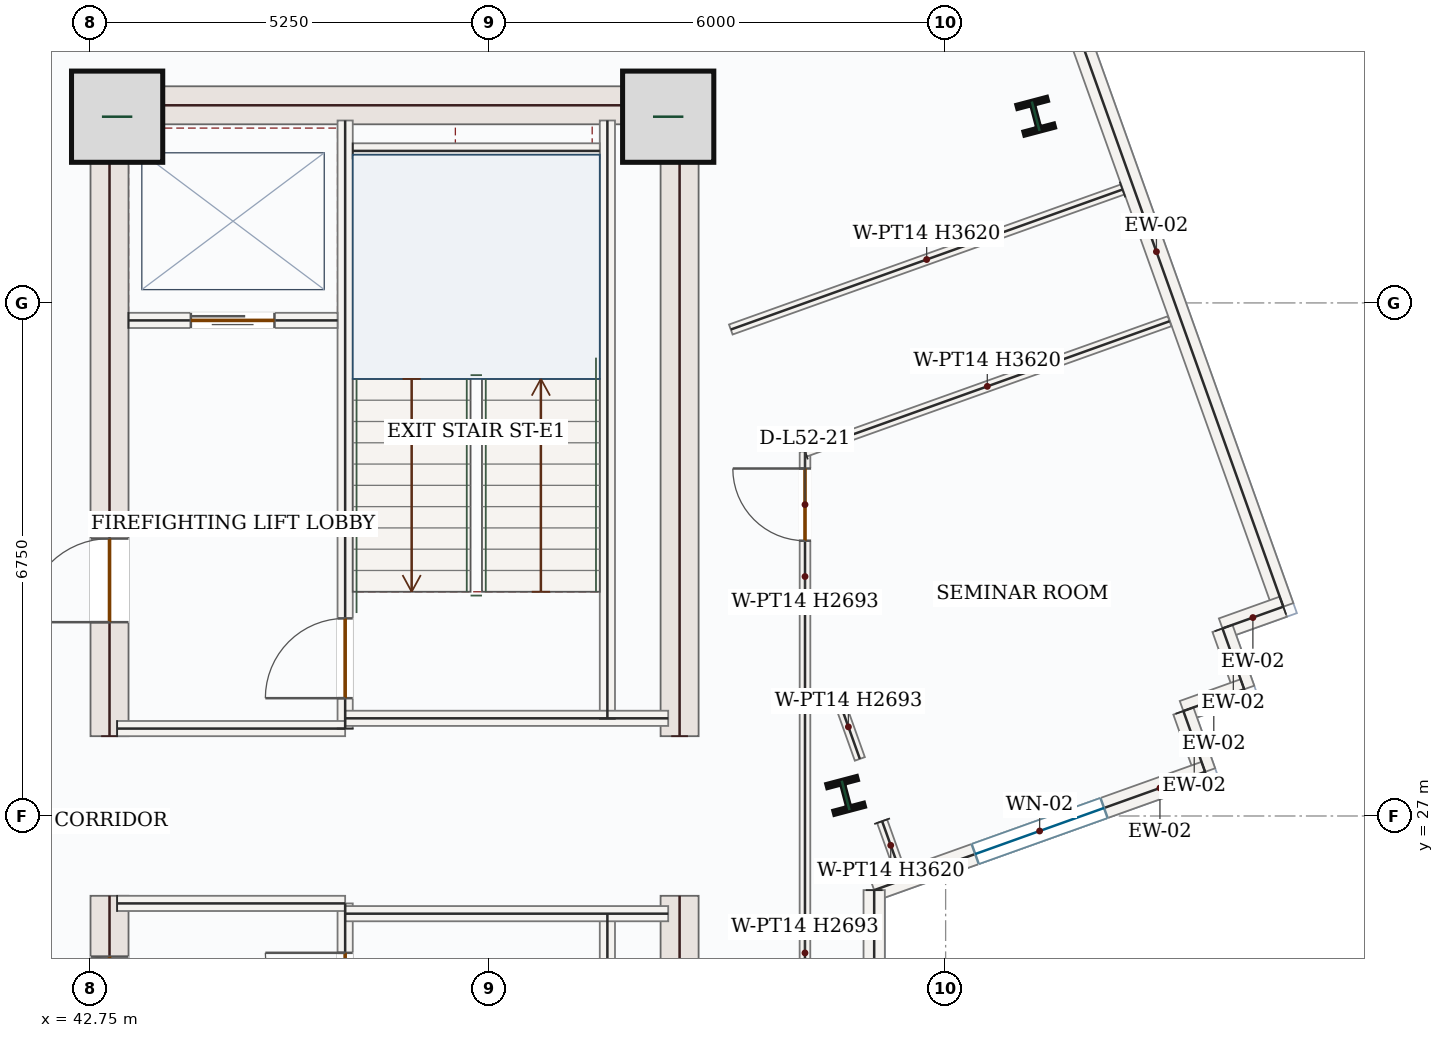
"""IFC4 building model, lengths in metres.
Left out: names, types, materials, properties, quantities, classifications, styles, units other than length and angle.
Written with IfcOpenShell. Run it as: python <this file> out.ifc"""

import sys

from ifc_helpers import new_model, si_unit, direction, frame, frame_2d, origin, origin_2d, place, context, subcontext, project, spatial, rectangle, i_section, extrude, source, transform, mapped, element, fill, save


model = new_model("IFC4")
c1 = context("Model", 3, precision=1e-05, world=origin(), true_north=direction((0.0, 1.0)))
c2 = subcontext(c1, "Body", "Model", "MODEL_VIEW")
j1 = project(units=[si_unit("LENGTHUNIT", "METRE"), si_unit("PLANEANGLEUNIT", "RADIAN")], contexts=[c1])
p1 = place(None, origin())
s1 = spatial("IfcSite", under=j1, at=p1, CompositionType="ELEMENT")
p2 = place(p1, origin())
s2 = spatial("IfcBuilding", under=s1, at=p2, CompositionType="ELEMENT")
p3 = place(p2, frame((0.0, 0.0, 221.4)))
s3 = spatial("IfcBuildingStorey", under=s2, at=p3, CompositionType="ELEMENT", Elevation=221.4)
p4 = place(p3, frame((43.0, 17.4, 0.0), z_axis=(0.0, 0.0, 1.0), x_axis=(0.0, 1.0, 0.0)))
e1 = element("IfcWall", 1, at=p4, inside=s3, PredefinedType="SHEAR", context=c2, shape_type="SweptSolid", body=[
    extrude(rectangle(XDim=8.55, YDim=0.5, at=frame_2d((4.275, 0.0))), origin(), (0.0, 0.0, 1.0), 3.62),
])
p5 = place(p4, frame((6.65, 0.0, 0.0)))
e2 = element("IfcOpeningElement", 2, at=p5, cuts=e1, PredefinedType="OPENING", context=c2, shape_type="SweptSolid", body=[
    extrude(rectangle(XDim=1.1, YDim=2.2, at=frame_2d((0.55, 1.1))), frame((0.0, 0.26, 0.0), z_axis=(0.0, -1.0, 0.0), x_axis=(1.0, 0.0, 0.0)), (0.0, 0.0, 1.0), 0.52),
])
p6 = place(p4, frame((1.75, 0.0, 0.0)))
e3 = element("IfcOpeningElement", 3, at=p6, cuts=e1, PredefinedType="OPENING", context=c2, shape_type="SweptSolid", body=[
    extrude(rectangle(XDim=1.3, YDim=2.2, at=frame_2d((0.65, 1.1))), frame((0.0, 0.26, 0.0), z_axis=(0.0, -1.0, 0.0), x_axis=(1.0, 0.0, 0.0)), (0.0, 0.0, 1.0), 0.52),
])
p7 = place(p4, frame((4.55, 0.0, 0.0)))
e4 = element("IfcOpeningElement", 4, at=p7, cuts=e1, PredefinedType="OPENING", context=c2, shape_type="SweptSolid", body=[
    extrude(rectangle(XDim=0.88, YDim=2.1, at=frame_2d((0.44, 1.05))), frame((0.0, 0.26, 0.0), z_axis=(0.0, -1.0, 0.0), x_axis=(1.0, 0.0, 0.0)), (0.0, 0.0, 1.0), 0.52),
])
p8 = place(p3, frame((43.0, 28.05, 0.0), z_axis=(0.0, 0.0, 1.0), x_axis=(0.0, 1.0, 0.0)))
e5 = element("IfcWall", 5, at=p8, inside=s3, PredefinedType="SHEAR", context=c2, shape_type="SweptSolid", body=[
    extrude(rectangle(XDim=8.55, YDim=0.5, at=frame_2d((4.275, 0.0))), origin(), (0.0, 0.0, 1.0), 3.62),
])
p9 = place(p8, frame((1.5, 0.0, 0.0)))
e6 = element("IfcOpeningElement", 6, at=p9, cuts=e5, PredefinedType="OPENING", context=c2, shape_type="SweptSolid", body=[
    extrude(rectangle(XDim=1.1, YDim=2.2, at=frame_2d((0.55, 1.1))), frame((0.0, 0.26, 0.0), z_axis=(0.0, -1.0, 0.0), x_axis=(1.0, 0.0, 0.0)), (0.0, 0.0, 1.0), 0.52),
])
m1 = source(origin(), c2, "Body", "SweptSolid", [
    extrude(rectangle(XDim=8.55, YDim=0.5, at=frame_2d((4.275, 0.0))), origin(), (0.0, 0.0, 1.0), 3.62),
])
for number, where, z_axis, x_axis in (
    (7, (50.5, 17.4, 0.0), (0.0, 0.0, 1.0), (0.0, 1.0, 0.0)),
    (8, (50.5, 28.05, 0.0), (0.0, 0.0, 1.0), (0.0, 1.0, 0.0)),
):
    element("IfcWall", number, at=place(p3, frame(where, z_axis=z_axis, x_axis=x_axis)), inside=s3, PredefinedType="SHEAR", context=c2, shape_type="MappedRepresentation", body=[
        mapped(m1, transform((0.0, 0.0, 0.0), x_axis=(1.0, 0.0, 0.0), y_axis=(0.0, 1.0, 0.0), z_axis=(0.0, 0.0, 1.0), scale=1.0)),
    ])
m2 = source(origin(), c2, "Body", "SweptSolid", [
    extrude(rectangle(XDim=7.0, YDim=0.5, at=frame_2d((3.5, 0.0))), origin(), (0.0, 0.0, 1.0), 3.62),
])
p10 = place(p3, frame((43.25, 36.35, 0.0), z_axis=(0.0, 0.0, 1.0), x_axis=(1.0, 0.0, 0.0)))
e9 = element("IfcWall", 9, at=p10, inside=s3, PredefinedType="SHEAR", context=c2, shape_type="MappedRepresentation", body=[
    mapped(m2, transform((0.0, 0.0, 0.0), x_axis=(1.0, 0.0, 0.0), y_axis=(0.0, 1.0, 0.0), z_axis=(0.0, 0.0, 1.0), scale=1.0)),
])
m3 = source(origin(), c2, "Body", "SweptSolid", [
    extrude(rectangle(XDim=1.2, YDim=1.2, at=origin_2d()), origin(), (0.0, 0.0, 1.0), 3.9),
])
for number, where, z_axis, x_axis in (
    (10, (43.1, 36.2, 0.0), (0.0, 0.0, 1.0), (1.0, 0.0, 0.0)),
    (11, (50.35, 36.2, 0.0), (0.0, 0.0, 1.0), (1.0, 0.0, 0.0)),
):
    element("IfcColumn", number, at=place(p3, frame(where, z_axis=z_axis, x_axis=x_axis)), inside=s3, PredefinedType="COLUMN", context=c2, shape_type="MappedRepresentation", body=[
        mapped(m3, transform((0.0, 0.0, 0.0), x_axis=(1.0, 0.0, 0.0), y_axis=(0.0, 1.0, 0.0), z_axis=(0.0, 0.0, 1.0), scale=1.0)),
    ])
m4 = source(origin(), c2, "Body", "SweptSolid", [
    extrude(i_section(OverallWidth=0.404, OverallDepth=0.407, WebThickness=0.027, FlangeThickness=0.044, FilletRadius=0.018, at=origin_2d()), origin(), (0.0, 0.0, 1.0), 3.9),
])
for number, where, z_axis, x_axis in (
    (12, (52.684, 27.271, 0.0), (0.0, 0.0, 1.0), (0.967, 0.255, 0.0)),
    (13, (55.185, 36.206, 0.0), (0.0, 0.0, 1.0), (0.967, 0.255, 0.0)),
):
    element("IfcColumn", number, at=place(p3, frame(where, z_axis=z_axis, x_axis=x_axis)), inside=s3, PredefinedType="COLUMN", context=c2, shape_type="MappedRepresentation", body=[
        mapped(m4, transform((0.0, 0.0, 0.0), x_axis=(1.0, 0.0, 0.0), y_axis=(0.0, 1.0, 0.0), z_axis=(0.0, 0.0, 1.0), scale=1.0)),
    ])
m5 = source(origin(), c2, "Body", "SweptSolid", [
    extrude(rectangle(XDim=9.92, YDim=0.28, at=frame_2d((4.96, 0.0))), origin(), (0.0, 0.0, 1.0), 3.62),
])
p11 = place(p3, frame((55.104, 39.095, 0.0), z_axis=(0.0, 0.0, 1.0), x_axis=(0.336532833412, -0.941671732631, 0.0)))
e14 = element("IfcWall", 14, at=p11, inside=s3, PredefinedType="SOLIDWALL", context=c2, shape_type="MappedRepresentation", body=[
    mapped(m5, transform((0.0, 0.0, 0.0), x_axis=(1.0, 0.0, 0.0), y_axis=(0.0, 1.0, 0.0), z_axis=(0.0, 0.0, 1.0), scale=1.0)),
])
m6 = source(origin(), c2, "Body", "SweptSolid", [
    extrude(rectangle(XDim=0.85, YDim=0.28, at=frame_2d((0.425, 0.0))), origin(), (0.0, 0.0, 1.0), 3.62),
])
p12 = place(p3, frame((58.442, 29.754, 0.0), z_axis=(0.0, 0.0, 1.0), x_axis=(-0.941624872587, -0.33666392638, 0.0)))
e15 = element("IfcWall", 15, at=p12, inside=s3, PredefinedType="SOLIDWALL", context=c2, shape_type="MappedRepresentation", body=[
    mapped(m6, transform((0.0, 0.0, 0.0), x_axis=(1.0, 0.0, 0.0), y_axis=(0.0, 1.0, 0.0), z_axis=(0.0, 0.0, 1.0), scale=1.0)),
])
m7 = source(origin(), c2, "Body", "SweptSolid", [
    extrude(rectangle(XDim=0.85, YDim=0.28, at=frame_2d((0.425, 0.0))), origin(), (0.0, 0.0, 1.0), 3.62),
])
p13 = place(p3, frame((57.642, 29.468, 0.0), z_axis=(0.0, 0.0, 1.0), x_axis=(0.336318202891, -0.941748409292, 0.0)))
e16 = element("IfcWall", 16, at=p13, inside=s3, PredefinedType="SOLIDWALL", context=c2, shape_type="MappedRepresentation", body=[
    mapped(m7, transform((0.0, 0.0, 0.0), x_axis=(1.0, 0.0, 0.0), y_axis=(0.0, 1.0, 0.0), z_axis=(0.0, 0.0, 1.0), scale=1.0)),
])
p14 = place(p3, frame((57.928, 28.667, 0.0), z_axis=(0.0, 0.0, 1.0), x_axis=(-0.941715910258, -0.336409191858, 0.0)))
e17 = element("IfcWall", 17, at=p14, inside=s3, PredefinedType="SOLIDWALL", context=c2, shape_type="MappedRepresentation", body=[
    mapped(m6, transform((0.0, 0.0, 0.0), x_axis=(1.0, 0.0, 0.0), y_axis=(0.0, 1.0, 0.0), z_axis=(0.0, 0.0, 1.0), scale=1.0)),
])
p15 = place(p3, frame((57.128, 28.381, 0.0), z_axis=(0.0, 0.0, 1.0), x_axis=(0.336572886112, -0.941657417713, 0.0)))
e18 = element("IfcWall", 18, at=p15, inside=s3, PredefinedType="SOLIDWALL", context=c2, shape_type="MappedRepresentation", body=[
    mapped(m7, transform((0.0, 0.0, 0.0), x_axis=(1.0, 0.0, 0.0), y_axis=(0.0, 1.0, 0.0), z_axis=(0.0, 0.0, 1.0), scale=1.0)),
])
p16 = place(p3, frame((57.414, 27.581, 0.0), z_axis=(0.0, 0.0, 1.0), x_axis=(-0.941673795185, -0.336527062004, 0.0)))
e19 = element("IfcWall", 19, at=p16, inside=s3, PredefinedType="SOLIDWALL", context=c2, shape_type="SweptSolid", body=[
    extrude(rectangle(XDim=4.624, YDim=0.28, at=frame_2d((2.312, 0.0))), origin(), (0.0, 0.0, 1.0), 3.62),
])
p17 = place(p16, frame((1.412, 0.0, 0.85)))
e20 = element("IfcOpeningElement", 20, at=p17, cuts=e19, PredefinedType="OPENING", context=c2, shape_type="SweptSolid", body=[
    extrude(rectangle(XDim=1.8, YDim=1.75, at=frame_2d((0.9, 0.875))), frame((0.0, 0.15, 0.0), z_axis=(0.0, -1.0, 0.0), x_axis=(1.0, 0.0, 0.0)), (0.0, 0.0, 1.0), 0.3),
])
p18 = place(p3, frame((53.06, 26.025, 0.0), z_axis=(0.0, 0.0, 1.0), x_axis=(0.0, -1.0, 0.0)))
e21 = element("IfcWall", 21, at=p18, inside=s3, PredefinedType="SOLIDWALL", context=c2, shape_type="SweptSolid", body=[
    extrude(rectangle(XDim=7.567, YDim=0.28, at=frame_2d((3.783, 0.0))), origin(), (0.0, 0.0, 1.0), 3.62),
])
p19 = place(p18, frame((2.883, 0.0, 0.85)))
e22 = element("IfcOpeningElement", 22, at=p19, cuts=e21, PredefinedType="OPENING", context=c2, shape_type="SweptSolid", body=[
    extrude(rectangle(XDim=1.8, YDim=1.75, at=frame_2d((0.9, 0.875))), frame((0.0, 0.15, 0.0), z_axis=(0.0, -1.0, 0.0), x_axis=(1.0, 0.0, 0.0)), (0.0, 0.0, 1.0), 0.3),
])
m8 = source(origin(), c2, "Body", "SweptSolid", [
    extrude(rectangle(XDim=7.87, YDim=0.2, at=frame_2d((3.935, 0.0))), origin(), (0.0, 0.0, 1.0), 3.62),
])
for number, where, z_axis, x_axis in (
    (23, (49.55, 17.85, 0.0), (0.0, 0.0, 1.0), (0.0, 1.0, 0.0)),
    (24, (49.55, 28.28, 0.0), (0.0, 0.0, 1.0), (0.0, 1.0, 0.0)),
):
    element("IfcWall", number, at=place(p3, frame(where, z_axis=z_axis, x_axis=x_axis)), inside=s3, PredefinedType="SOLIDWALL", context=c2, shape_type="MappedRepresentation", body=[
        mapped(m8, transform((0.0, 0.0, 0.0), x_axis=(1.0, 0.0, 0.0), y_axis=(0.0, 1.0, 0.0), z_axis=(0.0, 0.0, 1.0), scale=1.0)),
    ])
p20 = place(p3, frame((46.1, 17.85, 0.0), z_axis=(0.0, 0.0, 1.0), x_axis=(0.0, 1.0, 0.0)))
e25 = element("IfcWall", 25, at=p20, inside=s3, PredefinedType="SOLIDWALL", context=c2, shape_type="SweptSolid", body=[
    extrude(rectangle(XDim=8.0, YDim=0.2, at=frame_2d((4.0, 0.0))), origin(), (0.0, 0.0, 1.0), 3.62),
])
p21 = place(p20, frame((6.3, 0.0, 0.0)))
e26 = element("IfcOpeningElement", 26, at=p21, cuts=e25, PredefinedType="OPENING", context=c2, shape_type="SweptSolid", body=[
    extrude(rectangle(XDim=1.05, YDim=2.15, at=frame_2d((0.525, 1.075))), frame((0.0, 0.11, 0.0), z_axis=(0.0, -1.0, 0.0), x_axis=(1.0, 0.0, 0.0)), (0.0, 0.0, 1.0), 0.22),
])
p22 = place(p3, frame((46.1, 28.15, 0.0), z_axis=(0.0, 0.0, 1.0), x_axis=(0.0, 1.0, 0.0)))
e27 = element("IfcWall", 27, at=p22, inside=s3, PredefinedType="SOLIDWALL", context=c2, shape_type="SweptSolid", body=[
    extrude(rectangle(XDim=8.0, YDim=0.2, at=frame_2d((4.0, 0.0))), origin(), (0.0, 0.0, 1.0), 3.62),
])
p23 = place(p22, frame((0.4, 0.0, 0.0)))
e28 = element("IfcOpeningElement", 28, at=p23, cuts=e27, PredefinedType="OPENING", context=c2, shape_type="SweptSolid", body=[
    extrude(rectangle(XDim=1.05, YDim=2.15, at=frame_2d((0.525, 1.075))), frame((0.0, 0.11, 0.0), z_axis=(0.0, -1.0, 0.0), x_axis=(1.0, 0.0, 0.0)), (0.0, 0.0, 1.0), 0.22),
])
m9 = source(origin(), c2, "Body", "SweptSolid", [
    extrude(rectangle(XDim=3.0, YDim=0.2, at=frame_2d((1.5, 0.0))), origin(), (0.0, 0.0, 1.0), 3.62),
])
p24 = place(p3, frame((43.1, 25.85, 0.0), z_axis=(0.0, 0.0, 1.0), x_axis=(1.0, 0.0, 0.0)))
e29 = element("IfcWall", 29, at=p24, inside=s3, PredefinedType="SOLIDWALL", context=c2, shape_type="MappedRepresentation", body=[
    mapped(m9, transform((0.0, 0.0, 0.0), x_axis=(1.0, 0.0, 0.0), y_axis=(0.0, 1.0, 0.0), z_axis=(0.0, 0.0, 1.0), scale=1.0)),
])
m10 = source(origin(), c2, "Body", "SweptSolid", [
    extrude(rectangle(XDim=4.25, YDim=0.2, at=frame_2d((2.125, 0.0))), origin(), (0.0, 0.0, 1.0), 3.62),
])
p25 = place(p3, frame((46.1, 25.715, 0.0), z_axis=(0.0, 0.0, 1.0), x_axis=(1.0, 0.0, 0.0)))
e30 = element("IfcWall", 30, at=p25, inside=s3, PredefinedType="SOLIDWALL", context=c2, shape_type="MappedRepresentation", body=[
    mapped(m10, transform((0.0, 0.0, 0.0), x_axis=(1.0, 0.0, 0.0), y_axis=(0.0, 1.0, 0.0), z_axis=(0.0, 0.0, 1.0), scale=1.0)),
])
p26 = place(p3, frame((43.1, 28.15, 0.0), z_axis=(0.0, 0.0, 1.0), x_axis=(1.0, 0.0, 0.0)))
e31 = element("IfcWall", 31, at=p26, inside=s3, PredefinedType="SOLIDWALL", context=c2, shape_type="MappedRepresentation", body=[
    mapped(m9, transform((0.0, 0.0, 0.0), x_axis=(1.0, 0.0, 0.0), y_axis=(0.0, 1.0, 0.0), z_axis=(0.0, 0.0, 1.0), scale=1.0)),
])
p27 = place(p3, frame((46.1, 28.285, 0.0), z_axis=(0.0, 0.0, 1.0), x_axis=(1.0, 0.0, 0.0)))
e32 = element("IfcWall", 32, at=p27, inside=s3, PredefinedType="SOLIDWALL", context=c2, shape_type="MappedRepresentation", body=[
    mapped(m10, transform((0.0, 0.0, 0.0), x_axis=(1.0, 0.0, 0.0), y_axis=(0.0, 1.0, 0.0), z_axis=(0.0, 0.0, 1.0), scale=1.0)),
])
m11 = source(origin(), c2, "Body", "SweptSolid", [
    extrude(rectangle(XDim=3.25, YDim=0.2, at=frame_2d((1.625, 0.0))), origin(), (0.0, 0.0, 1.0), 3.62),
])
p28 = place(p3, frame((46.2, 35.75, 0.0), z_axis=(0.0, 0.0, 1.0), x_axis=(1.0, 0.0, 0.0)))
e33 = element("IfcWall", 33, at=p28, inside=s3, PredefinedType="SOLIDWALL", context=c2, shape_type="MappedRepresentation", body=[
    mapped(m11, transform((0.0, 0.0, 0.0), x_axis=(1.0, 0.0, 0.0), y_axis=(0.0, 1.0, 0.0), z_axis=(0.0, 0.0, 1.0), scale=1.0)),
])
p29 = place(p3, frame((43.25, 33.52, 0.0), z_axis=(0.0, 0.0, 1.0), x_axis=(1.0, 0.0, 0.0)))
e34 = element("IfcWall", 34, at=p29, inside=s3, PredefinedType="SOLIDWALL", context=c2, shape_type="SweptSolid", body=[
    extrude(rectangle(XDim=2.75, YDim=0.2, at=frame_2d((1.375, 0.0))), origin(), (0.0, 0.0, 1.0), 3.62),
])
p30 = place(p29, frame((0.82, 0.0, 0.0)))
e35 = element("IfcOpeningElement", 35, at=p30, cuts=e34, PredefinedType="OPENING", context=c2, shape_type="SweptSolid", body=[
    extrude(rectangle(XDim=1.1, YDim=2.15, at=frame_2d((0.55, 1.075))), frame((0.0, 0.11, 0.0), z_axis=(0.0, -1.0, 0.0), x_axis=(1.0, 0.0, 0.0)), (0.0, 0.0, 1.0), 0.22),
])
m12 = source(origin(), c2, "Body", "SweptSolid", [
    extrude(rectangle(XDim=9.038, YDim=0.14, at=frame_2d((4.519, 0.0))), origin(), (0.0, 0.0, 1.0), 2.693),
])
p31 = place(p3, frame((52.149, 20.68, 0.0), z_axis=(0.0, 0.0, 1.0), x_axis=(0.000135065776, 0.999999990879, 0.0)))
e36 = element("IfcWall", 36, at=p31, inside=s3, PredefinedType="PARTITIONING", context=c2, shape_type="MappedRepresentation", body=[
    mapped(m12, transform((0.0, 0.0, 0.0), x_axis=(1.0, 0.0, 0.0), y_axis=(0.0, 1.0, 0.0), z_axis=(0.0, 0.0, 1.0), scale=1.0)),
])
m13 = source(origin(), c2, "Body", "SweptSolid", [
    extrude(rectangle(XDim=0.896, YDim=0.14, at=frame_2d((0.448, 0.0))), origin(), (0.0, 0.0, 1.0), 2.693),
])
p32 = place(p3, frame((52.57, 28.595, 0.0), z_axis=(0.0, 0.0, 1.0), x_axis=(0.336509001165, -0.941680249413, 0.0)))
e37 = element("IfcWall", 37, at=p32, inside=s3, PredefinedType="PARTITIONING", context=c2, shape_type="MappedRepresentation", body=[
    mapped(m13, transform((0.0, 0.0, 0.0), x_axis=(1.0, 0.0, 0.0), y_axis=(0.0, 1.0, 0.0), z_axis=(0.0, 0.0, 1.0), scale=1.0)),
])
m14 = source(origin(), c2, "Body", "SweptSolid", [
    extrude(rectangle(XDim=0.674, YDim=0.14, at=frame_2d((0.337, 0.0))), origin(), (0.0, 0.0, 1.0), 3.62),
])
p33 = place(p3, frame((53.164, 26.931, 0.0), z_axis=(0.0, 0.0, 1.0), x_axis=(0.336588856473, -0.941651709337, 0.0)))
e38 = element("IfcWall", 38, at=p33, inside=s3, PredefinedType="PARTITIONING", context=c2, shape_type="MappedRepresentation", body=[
    mapped(m14, transform((0.0, 0.0, 0.0), x_axis=(1.0, 0.0, 0.0), y_axis=(0.0, 1.0, 0.0), z_axis=(0.0, 0.0, 1.0), scale=1.0)),
])
p34 = place(p3, frame((52.15, 29.829, 0.0), z_axis=(0.0, 0.0, 1.0), x_axis=(0.0, 1.0, 0.0)))
e39 = element("IfcWall", 39, at=p34, inside=s3, PredefinedType="PARTITIONING", context=c2, shape_type="SweptSolid", body=[
    extrude(rectangle(XDim=1.966, YDim=0.14, at=frame_2d((0.983, 0.0))), origin(), (0.0, 0.0, 1.0), 2.693),
])
p35 = place(p34, frame((0.792, 0.0, 0.0)))
e40 = element("IfcOpeningElement", 40, at=p35, cuts=e39, PredefinedType="OPENING", context=c2, shape_type="SweptSolid", body=[
    extrude(rectangle(XDim=0.95, YDim=2.15, at=frame_2d((0.475, 1.075))), frame((0.0, 0.08, 0.0), z_axis=(0.0, -1.0, 0.0), x_axis=(1.0, 0.0, 0.0)), (0.0, 0.0, 1.0), 0.16),
])
m15 = source(origin(), c2, "Body", "SweptSolid", [
    extrude(rectangle(XDim=5.093, YDim=0.14, at=frame_2d((2.547, 0.0))), origin(), (0.0, 0.0, 1.0), 3.62),
])
p36 = place(p3, frame((52.15, 31.795, 0.0), z_axis=(0.0, 0.0, 1.0), x_axis=(0.941667058904, 0.336545910947, 0.0)))
e41 = element("IfcWall", 41, at=p36, inside=s3, PredefinedType="PARTITIONING", context=c2, shape_type="MappedRepresentation", body=[
    mapped(m15, transform((0.0, 0.0, 0.0), x_axis=(1.0, 0.0, 0.0), y_axis=(0.0, 1.0, 0.0), z_axis=(0.0, 0.0, 1.0), scale=1.0)),
])
m16 = source(origin(), c2, "Body", "SweptSolid", [
    extrude(rectangle(XDim=5.473, YDim=0.14, at=frame_2d((2.736, 0.0))), origin(), (0.0, 0.0, 1.0), 3.62),
])
p37 = place(p3, frame((56.327, 35.242, 0.0), z_axis=(0.0, 0.0, 1.0), x_axis=(-0.941665179086, -0.336551170695, 0.0)))
e42 = element("IfcWall", 42, at=p37, inside=s3, PredefinedType="PARTITIONING", context=c2, shape_type="MappedRepresentation", body=[
    mapped(m16, transform((0.0, 0.0, 0.0), x_axis=(1.0, 0.0, 0.0), y_axis=(0.0, 1.0, 0.0), z_axis=(0.0, 0.0, 1.0), scale=1.0)),
])
m17 = source(origin(), c2, "Body", "SweptSolid", [
    extrude(rectangle(XDim=1.8, YDim=1.75, at=frame_2d((0.9, 0.875))), frame((0.0, 0.03, 0.0), z_axis=(0.0, -1.0, 0.0), x_axis=(1.0, 0.0, 0.0)), (0.0, 0.0, 1.0), 0.06),
])
p38 = place(p17, origin())
e43 = element("IfcWindow", 43, at=p38, inside=s3, PartitioningType="DOUBLE_PANEL_VERTICAL", PredefinedType="WINDOW", context=c2, shape_type="MappedRepresentation", body=[
    mapped(m17, transform((0.0, 0.0, 0.0), x_axis=(1.0, 0.0, 0.0), y_axis=(0.0, 1.0, 0.0), z_axis=(0.0, 0.0, 1.0), scale=1.0)),
])
fill(e20, e43)
m18 = source(origin(), c2, "Body", "SweptSolid", [
    extrude(rectangle(XDim=1.05, YDim=2.15, at=frame_2d((0.525, 1.075))), frame((0.0, 0.025, 0.0), z_axis=(0.0, -1.0, 0.0), x_axis=(1.0, 0.0, 0.0)), (0.0, 0.0, 1.0), 0.05),
])
p39 = place(p23, origin())
e44 = element("IfcDoor", 44, at=p39, inside=s3, OperationType="SINGLE_SWING_LEFT", PredefinedType="DOOR", context=c2, shape_type="MappedRepresentation", body=[
    mapped(m18, transform((0.0, 0.0, 0.0), x_axis=(1.0, 0.0, 0.0), y_axis=(0.0, 1.0, 0.0), z_axis=(0.0, 0.0, 1.0), scale=1.0)),
])
fill(e28, e44)
p40 = place(p21, origin())
e45 = element("IfcDoor", 45, at=p40, inside=s3, OperationType="SINGLE_SWING_RIGHT", PredefinedType="DOOR", context=c2, shape_type="MappedRepresentation", body=[
    mapped(m18, transform((0.0, 0.0, 0.0), x_axis=(1.0, 0.0, 0.0), y_axis=(0.0, 1.0, 0.0), z_axis=(0.0, 0.0, 1.0), scale=1.0)),
])
fill(e26, e45)
m19 = source(origin(), c2, "Body", "SweptSolid", [
    extrude(rectangle(XDim=1.1, YDim=2.15, at=frame_2d((0.55, 1.075))), frame((0.0, 0.025, 0.0), z_axis=(0.0, -1.0, 0.0), x_axis=(1.0, 0.0, 0.0)), (0.0, 0.0, 1.0), 0.05),
])
p41 = place(p30, origin())
e46 = element("IfcDoor", 46, at=p41, inside=s3, OperationType="DOUBLE_DOOR_SLIDING", PredefinedType="DOOR", context=c2, shape_type="MappedRepresentation", body=[
    mapped(m19, transform((0.0, 0.0, 0.0), x_axis=(1.0, 0.0, 0.0), y_axis=(0.0, 1.0, 0.0), z_axis=(0.0, 0.0, 1.0), scale=1.0)),
])
fill(e35, e46)
m20 = source(origin(), c2, "Body", "SweptSolid", [
    extrude(rectangle(XDim=1.1, YDim=2.2, at=frame_2d((0.55, 1.1))), frame((0.0, 0.025, 0.0), z_axis=(0.0, -1.0, 0.0), x_axis=(1.0, 0.0, 0.0)), (0.0, 0.0, 1.0), 0.05),
])
p42 = place(p9, origin())
e47 = element("IfcDoor", 47, at=p42, inside=s3, OperationType="SINGLE_SWING_LEFT", PredefinedType="DOOR", context=c2, shape_type="MappedRepresentation", body=[
    mapped(m20, transform((0.0, 0.0, 0.0), x_axis=(1.0, 0.0, 0.0), y_axis=(0.0, 1.0, 0.0), z_axis=(0.0, 0.0, 1.0), scale=1.0)),
])
fill(e6, e47)
p43 = place(p5, origin())
e48 = element("IfcDoor", 48, at=p43, inside=s3, OperationType="SINGLE_SWING_LEFT", PredefinedType="DOOR", context=c2, shape_type="MappedRepresentation", body=[
    mapped(m20, transform((0.0, 0.0, 0.0), x_axis=(1.0, 0.0, 0.0), y_axis=(0.0, 1.0, 0.0), z_axis=(0.0, 0.0, 1.0), scale=1.0)),
])
fill(e2, e48)
m21 = source(origin(), c2, "Body", "SweptSolid", [
    extrude(rectangle(XDim=0.95, YDim=2.15, at=frame_2d((0.475, 1.075))), frame((0.0, 0.025, 0.0), z_axis=(0.0, -1.0, 0.0), x_axis=(1.0, 0.0, 0.0)), (0.0, 0.0, 1.0), 0.05),
])
p44 = place(p35, origin())
e49 = element("IfcDoor", 49, at=p44, inside=s3, OperationType="SINGLE_SWING_RIGHT", PredefinedType="DOOR", context=c2, shape_type="MappedRepresentation", body=[
    mapped(m21, transform((0.0, 0.0, 0.0), x_axis=(1.0, 0.0, 0.0), y_axis=(0.0, 1.0, 0.0), z_axis=(0.0, 0.0, 1.0), scale=1.0)),
])
fill(e40, e49)
save(model, sys.argv[1])
